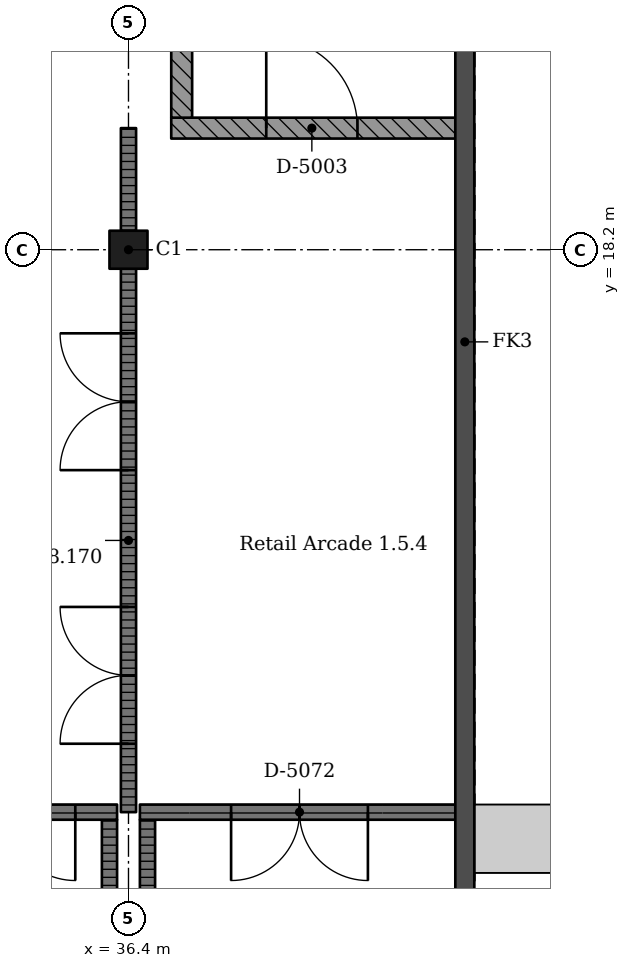
"""IFC4 building model, lengths in metres.
Left out: names, types, materials, properties, quantities, classifications, styles, units other than length and angle.
Written with IfcOpenShell. Run it as: python <this file> out.ifc"""

import sys

from ifc_helpers import new_model, si_unit, direction, frame, frame_2d, origin, origin_2d, place, context, subcontext, project, spatial, rectangle, extrude, element, fill, save


model = new_model("IFC4")
c1 = context("Model", 3, precision=1e-05, world=origin(), true_north=direction((0.0, 1.0)))
c2 = subcontext(c1, "Body", "Model", "MODEL_VIEW")
j1 = project(units=[si_unit("LENGTHUNIT", "METRE"), si_unit("PLANEANGLEUNIT", "RADIAN")], contexts=[c1])
p1 = place(None, origin())
s1 = spatial("IfcSite", under=j1, at=p1, CompositionType="ELEMENT")
p2 = place(p1, origin())
s2 = spatial("IfcBuilding", under=s1, at=p2, CompositionType="ELEMENT")
p3 = place(p2, frame((0.0, 0.0, 24.57)))
s3 = spatial("IfcBuildingStorey", under=s2, at=p3, CompositionType="ELEMENT", Elevation=24.57)
p4 = place(p3, frame((36.4, 18.2, 0.0), z_axis=(0.0, 0.0, 1.0), x_axis=(1.0, 0.0, 0.0)))
e1 = element("IfcColumn", 1, at=p4, inside=s3, PredefinedType="COLUMN", context=c2, shape_type="SweptSolid", body=[
    extrude(rectangle(XDim=0.5, YDim=0.5, at=origin_2d()), origin(), (0.0, 0.0, 1.0), 4.55),
])
p5 = place(p3, frame((40.825, 40.95, 0.0), z_axis=(0.0, 0.0, 1.0), x_axis=(0.0, -1.0, 0.0)))
e2 = element("IfcWall", 2, at=p5, inside=s3, PredefinedType="SHEAR", context=c2, shape_type="SweptSolid", body=[
    extrude(rectangle(XDim=31.85, YDim=0.25, at=frame_2d((15.925, 0.0))), origin(), (0.0, 0.0, 1.0), 4.55),
])
p6 = place(p3, frame((36.15, 9.35, 0.0), z_axis=(0.0, 0.0, 1.0), x_axis=(0.0, 1.0, 0.0)))
e3 = element("IfcWall", 3, at=p6, inside=s3, PredefinedType="PARTITIONING", context=c2, shape_type="SweptSolid", body=[
    extrude(rectangle(XDim=1.35, YDim=0.2, at=frame_2d((0.675, 0.0))), origin(), (0.0, 0.0, 1.0), 3.6),
])
p7 = place(p3, frame((36.25, 10.8, 0.0), z_axis=(0.0, 0.0, 1.0), x_axis=(-1.0, 0.0, 0.0)))
e4 = element("IfcWall", 4, at=p7, inside=s3, PredefinedType="PARTITIONING", context=c2, shape_type="SweptSolid", body=[
    extrude(rectangle(XDim=2.95, YDim=0.2, at=frame_2d((1.475, 0.0))), origin(), (0.0, 0.0, 1.0), 4.35),
])
p8 = place(p7, frame((0.55, 0.0, 0.0)))
e5 = element("IfcOpeningElement", 5, at=p8, cuts=e4, PredefinedType="OPENING", context=c2, shape_type="SweptSolid", body=[
    extrude(rectangle(XDim=1.8, YDim=2.4, at=frame_2d((0.9, 1.2))), frame((0.0, 0.11, 0.0), z_axis=(0.0, -1.0, 0.0), x_axis=(1.0, 0.0, 0.0)), (0.0, 0.0, 1.0), 0.22),
])
p9 = place(p3, frame((36.4, 17.95, 0.0), z_axis=(0.0, 0.0, 1.0), x_axis=(0.0, -1.0, 0.0)))
e6 = element("IfcWall", 6, at=p9, inside=s3, PredefinedType="PARTITIONING", context=c2, shape_type="SweptSolid", body=[
    extrude(rectangle(XDim=7.15, YDim=0.2, at=frame_2d((3.575, 0.0))), origin(), (0.0, 0.0, 1.0), 3.6),
])
p10 = place(p9, frame((0.85, 0.0, 0.0)))
e7 = element("IfcOpeningElement", 7, at=p10, cuts=e6, PredefinedType="OPENING", context=c2, shape_type="SweptSolid", body=[
    extrude(rectangle(XDim=1.8, YDim=2.4, at=frame_2d((0.9, 1.2))), frame((0.0, 0.11, 0.0), z_axis=(0.0, -1.0, 0.0), x_axis=(1.0, 0.0, 0.0)), (0.0, 0.0, 1.0), 0.22),
])
p11 = place(p9, frame((4.45, 0.0, 0.0)))
e8 = element("IfcOpeningElement", 8, at=p11, cuts=e6, PredefinedType="OPENING", context=c2, shape_type="SweptSolid", body=[
    extrude(rectangle(XDim=1.8, YDim=2.4, at=frame_2d((0.9, 1.2))), frame((0.0, 0.11, 0.0), z_axis=(0.0, -1.0, 0.0), x_axis=(1.0, 0.0, 0.0)), (0.0, 0.0, 1.0), 0.22),
])
p12 = place(p3, frame((36.4, 19.8, 0.0), z_axis=(0.0, 0.0, 1.0), x_axis=(0.0, -1.0, 0.0)))
e9 = element("IfcWall", 9, at=p12, inside=s3, PredefinedType="PARTITIONING", context=c2, shape_type="SweptSolid", body=[
    extrude(rectangle(XDim=1.35, YDim=0.2, at=frame_2d((0.675, 0.0))), origin(), (0.0, 0.0, 1.0), 3.6),
])
p13 = place(p3, frame((36.65, 10.7, 0.0), z_axis=(0.0, 0.0, 1.0), x_axis=(0.0, -1.0, 0.0)))
e10 = element("IfcWall", 10, at=p13, inside=s3, PredefinedType="PARTITIONING", context=c2, shape_type="SweptSolid", body=[
    extrude(rectangle(XDim=1.35, YDim=0.2, at=frame_2d((0.675, 0.0))), origin(), (0.0, 0.0, 1.0), 3.6),
])
p14 = place(p3, frame((36.962, 19.8, 0.0), z_axis=(0.0, 0.0, 1.0), x_axis=(1.0, 0.0, 0.0)))
e11 = element("IfcWall", 11, at=p14, inside=s3, PredefinedType="SOLIDWALL", context=c2, shape_type="SweptSolid", body=[
    extrude(rectangle(XDim=3.738, YDim=0.275, at=frame_2d((1.869, 0.0))), origin(), (0.0, 0.0, 1.0), 4.35),
])
p15 = place(p14, frame((1.25, 0.0, 0.0)))
e12 = element("IfcOpeningElement", 12, at=p15, cuts=e11, PredefinedType="OPENING", context=c2, shape_type="SweptSolid", body=[
    extrude(rectangle(XDim=1.2, YDim=2.4, at=frame_2d((0.6, 1.2))), frame((0.0, 0.147, 0.0), z_axis=(0.0, -1.0, 0.0), x_axis=(1.0, 0.0, 0.0)), (0.0, 0.0, 1.0), 0.295),
])
p16 = place(p3, frame((37.1, 26.913, 0.0), z_axis=(0.0, 0.0, 1.0), x_axis=(0.0, -1.0, 0.0)))
e13 = element("IfcWall", 13, at=p16, inside=s3, PredefinedType="SOLIDWALL", context=c2, shape_type="SweptSolid", body=[
    extrude(rectangle(XDim=6.975, YDim=0.275, at=frame_2d((3.488, 0.0))), origin(), (0.0, 0.0, 1.0), 4.35),
])
p17 = place(p3, frame((40.7, 10.8, 0.0), z_axis=(0.0, 0.0, 1.0), x_axis=(-1.0, 0.0, 0.0)))
e14 = element("IfcWall", 14, at=p17, inside=s3, PredefinedType="PARTITIONING", context=c2, shape_type="SweptSolid", body=[
    extrude(rectangle(XDim=4.15, YDim=0.2, at=frame_2d((2.075, 0.0))), origin(), (0.0, 0.0, 1.0), 4.35),
])
p18 = place(p17, frame((1.15, 0.0, 0.0)))
e15 = element("IfcOpeningElement", 15, at=p18, cuts=e14, PredefinedType="OPENING", context=c2, shape_type="SweptSolid", body=[
    extrude(rectangle(XDim=1.8, YDim=2.4, at=frame_2d((0.9, 1.2))), frame((0.0, 0.11, 0.0), z_axis=(0.0, -1.0, 0.0), x_axis=(1.0, 0.0, 0.0)), (0.0, 0.0, 1.0), 0.22),
])
p19 = place(p15, origin())
e16 = element("IfcDoor", 16, at=p19, inside=s3, OperationType="SINGLE_SWING_RIGHT", PredefinedType="DOOR", context=c2, shape_type="SweptSolid", body=[
    extrude(rectangle(XDim=1.2, YDim=2.4, at=frame_2d((0.6, 1.2))), frame((0.0, 0.025, 0.0), z_axis=(0.0, -1.0, 0.0), x_axis=(1.0, 0.0, 0.0)), (0.0, 0.0, 1.0), 0.05),
])
fill(e12, e16)
p20 = place(p10, origin())
e17 = element("IfcDoor", 17, at=p20, inside=s3, OperationType="DOUBLE_DOOR_SINGLE_SWING", PredefinedType="DOOR", context=c2, shape_type="SweptSolid", body=[
    extrude(rectangle(XDim=1.8, YDim=2.4, at=frame_2d((0.9, 1.2))), frame((0.0, 0.025, 0.0), z_axis=(0.0, -1.0, 0.0), x_axis=(1.0, 0.0, 0.0)), (0.0, 0.0, 1.0), 0.05),
])
fill(e7, e17)
p21 = place(p11, origin())
e18 = element("IfcDoor", 18, at=p21, inside=s3, OperationType="DOUBLE_DOOR_SINGLE_SWING", PredefinedType="DOOR", context=c2, shape_type="SweptSolid", body=[
    extrude(rectangle(XDim=1.8, YDim=2.4, at=frame_2d((0.9, 1.2))), frame((0.0, 0.025, 0.0), z_axis=(0.0, -1.0, 0.0), x_axis=(1.0, 0.0, 0.0)), (0.0, 0.0, 1.0), 0.05),
])
fill(e8, e18)
p22 = place(p8, origin())
e19 = element("IfcDoor", 19, at=p22, inside=s3, OperationType="DOUBLE_DOOR_SINGLE_SWING", PredefinedType="DOOR", context=c2, shape_type="SweptSolid", body=[
    extrude(rectangle(XDim=1.8, YDim=2.4, at=frame_2d((0.9, 1.2))), frame((0.0, 0.025, 0.0), z_axis=(0.0, -1.0, 0.0), x_axis=(1.0, 0.0, 0.0)), (0.0, 0.0, 1.0), 0.05),
])
fill(e5, e19)
p23 = place(p18, origin())
e20 = element("IfcDoor", 20, at=p23, inside=s3, OperationType="DOUBLE_DOOR_SINGLE_SWING", PredefinedType="DOOR", context=c2, shape_type="SweptSolid", body=[
    extrude(rectangle(XDim=1.8, YDim=2.4, at=frame_2d((0.9, 1.2))), frame((0.0, 0.025, 0.0), z_axis=(0.0, -1.0, 0.0), x_axis=(1.0, 0.0, 0.0)), (0.0, 0.0, 1.0), 0.05),
])
fill(e15, e20)
save(model, sys.argv[1])
